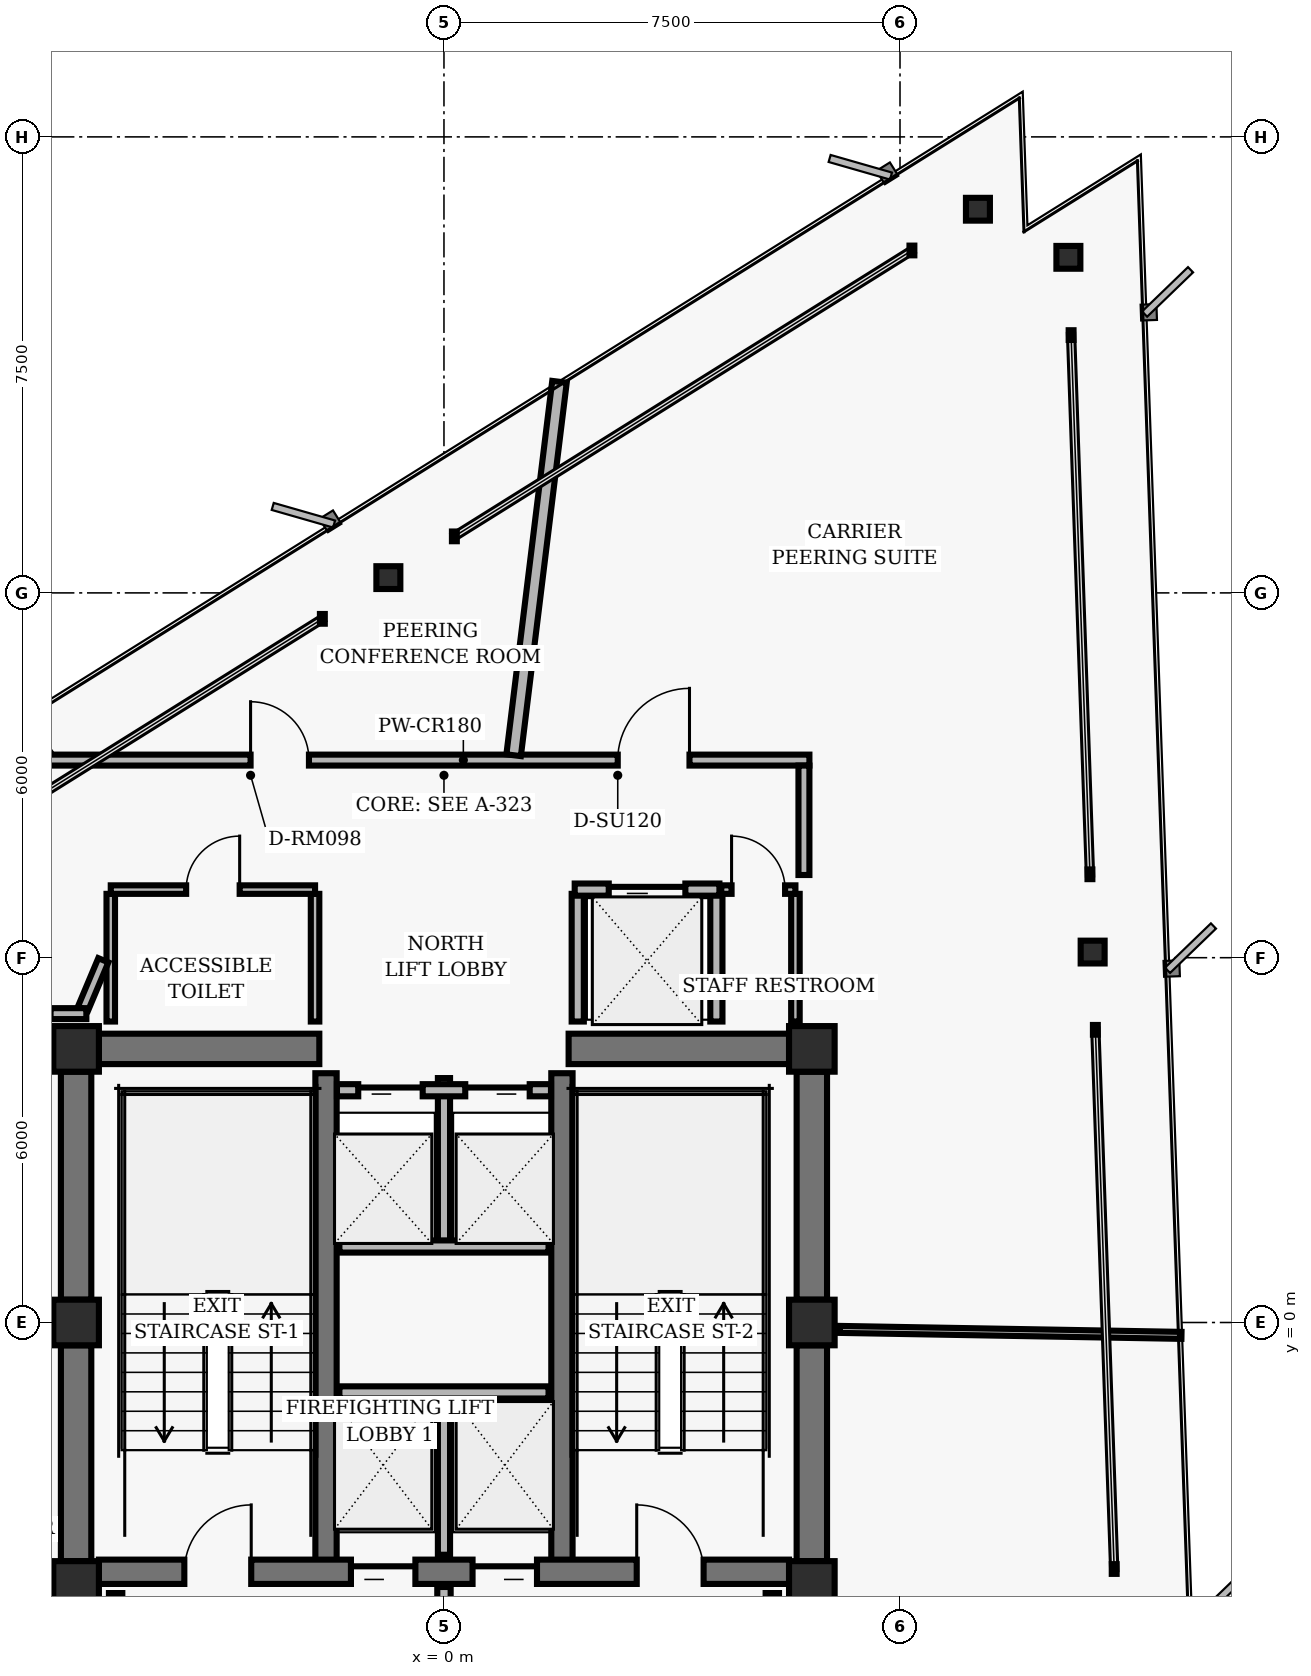
"""IFC4 building model, lengths in metres.
Left out: names, types, materials, properties, quantities, classifications, styles, units other than length and angle.
Written with IfcOpenShell. Run it as: python <this file> out.ifc"""

import sys

from ifc_helpers import new_model, si_unit, direction, frame, frame_2d, origin, origin_2d, place, context, subcontext, project, spatial, rectangle, hollow_rectangle, i_section, extrude, element, fill, save


model = new_model("IFC4")
c1 = context("Model", 3, precision=1e-05, world=origin(), true_north=direction((0.0, 1.0)))
c2 = subcontext(c1, "Body", "Model", "MODEL_VIEW")
j1 = project(units=[si_unit("LENGTHUNIT", "METRE"), si_unit("PLANEANGLEUNIT", "RADIAN")], contexts=[c1])
p1 = place(None, origin())
s1 = spatial("IfcSite", under=j1, at=p1, CompositionType="ELEMENT")
p2 = place(p1, origin())
s2 = spatial("IfcBuilding", under=s1, at=p2, CompositionType="ELEMENT")
p3 = place(p2, frame((0.0, 0.0, 211.84)))
s3 = spatial("IfcBuildingStorey", under=s2, at=p3, CompositionType="ELEMENT", Elevation=211.84)
for number, where, z_axis, x_axis in (
    (1, (-6.05, 4.5, 0.0), (0.0, 0.0, 1.0), (1.0, 0.0, 0.0)),
    (2, (6.05, 4.5, 0.0), (0.0, 0.0, 1.0), (1.0, 0.0, 0.0)),
    (3, (-6.05, 0.0, 0.0), (0.0, 0.0, 1.0), (1.0, 0.0, 0.0)),
    (4, (6.05, 0.0, 0.0), (0.0, 0.0, 1.0), (1.0, 0.0, 0.0)),
    (5, (-6.05, -4.3, 0.0), (0.0, 0.0, 1.0), (1.0, 0.0, 0.0)),
    (6, (6.05, -4.3, 0.0), (0.0, 0.0, 1.0), (1.0, 0.0, 0.0)),
):
    element("IfcColumn", number, at=place(p3, frame(where, z_axis=z_axis, x_axis=x_axis)), inside=s3, PredefinedType="COLUMN", context=c2, shape_type="SweptSolid", body=[
        extrude(hollow_rectangle(XDim=0.75, YDim=0.75, WallThickness=0.05, InnerFilletRadius=0.02, OuterFilletRadius=0.04, at=origin_2d()), origin(), (0.0, 0.0, 1.0), 3.04),
    ])
p4 = place(p3, frame((-6.05, 0.375, 0.0), z_axis=(0.0, 0.0, 1.0), x_axis=(0.0, 1.0, 0.0)))
e7 = element("IfcWall", 7, at=p4, inside=s3, PredefinedType="SHEAR", context=c2, shape_type="SweptSolid", body=[
    extrude(rectangle(XDim=3.75, YDim=0.5, at=frame_2d((1.875, 0.0))), origin(), (0.0, 0.0, 1.0), 2.618),
])
p5 = place(p3, frame((-6.05, -3.925, 0.0), z_axis=(0.0, 0.0, 1.0), x_axis=(0.0, 1.0, 0.0)))
e8 = element("IfcWall", 8, at=p5, inside=s3, PredefinedType="SHEAR", context=c2, shape_type="SweptSolid", body=[
    extrude(rectangle(XDim=3.55, YDim=0.5, at=frame_2d((1.775, 0.0))), origin(), (0.0, 0.0, 1.0), 2.618),
])
p6 = place(p3, frame((6.05, 0.375, 0.0), z_axis=(0.0, 0.0, 1.0), x_axis=(0.0, 1.0, 0.0)))
e9 = element("IfcWall", 9, at=p6, inside=s3, PredefinedType="SHEAR", context=c2, shape_type="SweptSolid", body=[
    extrude(rectangle(XDim=3.75, YDim=0.5, at=frame_2d((1.875, 0.0))), origin(), (0.0, 0.0, 1.0), 2.618),
])
p7 = place(p3, frame((6.05, -3.925, 0.0), z_axis=(0.0, 0.0, 1.0), x_axis=(0.0, 1.0, 0.0)))
e10 = element("IfcWall", 10, at=p7, inside=s3, PredefinedType="SHEAR", context=c2, shape_type="SweptSolid", body=[
    extrude(rectangle(XDim=3.55, YDim=0.5, at=frame_2d((1.775, 0.0))), origin(), (0.0, 0.0, 1.0), 2.618),
])
for number, where, z_axis, x_axis in (
    (11, (-1.94, -4.1, 0.0), (0.0, 0.0, 1.0), (0.0, 1.0, 0.0)),
    (12, (1.94, -4.1, 0.0), (0.0, 0.0, 1.0), (0.0, 1.0, 0.0)),
):
    element("IfcWall", number, at=place(p3, frame(where, z_axis=z_axis, x_axis=x_axis)), inside=s3, PredefinedType="SHEAR", context=c2, shape_type="SweptSolid", body=[
        extrude(rectangle(XDim=8.2, YDim=0.35, at=frame_2d((4.1, 0.0))), origin(), (0.0, 0.0, 1.0), 2.618),
    ])
p8 = place(p3, frame((-5.675, -4.1, 0.0), z_axis=(0.0, 0.0, 1.0), x_axis=(1.0, 0.0, 0.0)))
e13 = element("IfcWall", 13, at=p8, inside=s3, PredefinedType="SHEAR", context=c2, shape_type="SweptSolid", body=[
    extrude(rectangle(XDim=11.35, YDim=0.4, at=frame_2d((5.675, 0.0))), origin(), (0.0, 0.0, 1.0), 2.618),
])
p9 = place(p8, frame((1.405, 0.0, 0.0)))
e14 = element("IfcOpeningElement", 14, at=p9, cuts=e13, PredefinedType="OPENING", context=c2, shape_type="SweptSolid", body=[
    extrude(rectangle(XDim=1.1, YDim=2.04, at=frame_2d((0.55, 1.02))), frame((0.0, 0.21, 0.0), z_axis=(0.0, -1.0, 0.0), x_axis=(1.0, 0.0, 0.0)), (0.0, 0.0, 1.0), 0.42),
])
p10 = place(p8, frame((8.845, 0.0, 0.0)))
e15 = element("IfcOpeningElement", 15, at=p10, cuts=e13, PredefinedType="OPENING", context=c2, shape_type="SweptSolid", body=[
    extrude(rectangle(XDim=1.1, YDim=2.04, at=frame_2d((0.55, 1.02))), frame((0.0, 0.21, 0.0), z_axis=(0.0, -1.0, 0.0), x_axis=(1.0, 0.0, 0.0)), (0.0, 0.0, 1.0), 0.42),
])
p11 = place(p8, frame((4.145, 0.0, 0.0)))
e16 = element("IfcOpeningElement", 16, at=p11, cuts=e13, PredefinedType="OPENING", context=c2, shape_type="SweptSolid", body=[
    extrude(rectangle(XDim=1.06, YDim=2.04, at=frame_2d((0.53, 1.02))), frame((0.0, 0.21, 0.0), z_axis=(0.0, -1.0, 0.0), x_axis=(1.0, 0.0, 0.0)), (0.0, 0.0, 1.0), 0.42),
])
p12 = place(p8, frame((6.145, 0.0, 0.0)))
e17 = element("IfcOpeningElement", 17, at=p12, cuts=e13, PredefinedType="OPENING", context=c2, shape_type="SweptSolid", body=[
    extrude(rectangle(XDim=1.06, YDim=2.04, at=frame_2d((0.53, 1.02))), frame((0.0, 0.21, 0.0), z_axis=(0.0, -1.0, 0.0), x_axis=(1.0, 0.0, 0.0)), (0.0, 0.0, 1.0), 0.42),
])
for number, where, z_axis, x_axis in (
    (18, (-5.675, 4.5, 0.0), (0.0, 0.0, 1.0), (1.0, 0.0, 0.0)),
    (19, (2.05, 4.5, 0.0), (0.0, 0.0, 1.0), (1.0, 0.0, 0.0)),
):
    element("IfcWall", number, at=place(p3, frame(where, z_axis=z_axis, x_axis=x_axis)), inside=s3, PredefinedType="SHEAR", context=c2, shape_type="SweptSolid", body=[
        extrude(rectangle(XDim=3.625, YDim=0.5, at=frame_2d((1.812, 0.0))), origin(), (0.0, 0.0, 1.0), 2.618),
    ])
for number, where, z_axis, x_axis in (
    (20, (10.668, 6.093, 0.0), (0.0, 0.0, 1.0), (1.0, 0.0, 0.0)),
    (21, (10.269, 17.519, 0.0), (0.0, 0.0, 1.0), (1.0, 0.0, 0.0)),
    (22, (8.781, 18.31, 0.0), (0.0, 0.0, 1.0), (1.0, 0.0, 0.0)),
    (23, (-0.915, 12.251, 0.0), (0.0, 0.0, 1.0), (1.0, 0.0, 0.0)),
):
    element("IfcColumn", number, at=place(p3, frame(where, z_axis=z_axis, x_axis=x_axis)), inside=s3, PredefinedType="COLUMN", context=c2, shape_type="SweptSolid", body=[
        extrude(i_section(OverallWidth=0.394, OverallDepth=0.375, WebThickness=0.017, FlangeThickness=0.028, FilletRadius=0.016, at=origin_2d()), origin(), (0.0, 0.0, 1.0), 3.04),
    ])
p13 = place(p3, frame((0.0, -3.82, 0.0), z_axis=(0.0, 0.0, 1.0), x_axis=(0.0, 1.0, 0.0)))
e24 = element("IfcWall", 24, at=p13, inside=s3, PredefinedType="PARTITIONING", context=c2, shape_type="SweptSolid", body=[
    extrude(rectangle(XDim=2.67, YDim=0.2, at=frame_2d((1.335, 0.0))), origin(), (0.0, 0.0, 1.0), 2.593),
])
p14 = place(p3, frame((-1.72, -1.15, 0.0), z_axis=(0.0, 0.0, 1.0), x_axis=(1.0, 0.0, 0.0)))
e25 = element("IfcWall", 25, at=p14, inside=s3, PredefinedType="PARTITIONING", context=c2, shape_type="SweptSolid", body=[
    extrude(rectangle(XDim=3.44, YDim=0.2, at=frame_2d((1.72, 0.0))), origin(), (0.0, 0.0, 1.0), 2.593),
])
for number, where, z_axis, x_axis in (
    (26, (-5.4, -7.16, 0.0), (0.0, 0.0, 1.0), (0.0, 1.0, 0.0)),
    (27, (5.4, -7.16, 0.0), (0.0, 0.0, 1.0), (0.0, 1.0, 0.0)),
):
    element("IfcWall", number, at=place(p3, frame(where, z_axis=z_axis, x_axis=x_axis)), inside=s3, PredefinedType="PARTITIONING", context=c2, shape_type="SweptSolid", body=[
        extrude(rectangle(XDim=2.71, YDim=0.22, at=frame_2d((1.355, 0.0))), origin(), (0.0, 0.0, 1.0), 2.593),
    ])
p15 = place(p3, frame((0.0, -7.16, 0.0), z_axis=(0.0, 0.0, 1.0), x_axis=(0.0, 1.0, 0.0)))
e28 = element("IfcWall", 28, at=p15, inside=s3, PredefinedType="PARTITIONING", context=c2, shape_type="SweptSolid", body=[
    extrude(rectangle(XDim=2.81, YDim=0.22, at=frame_2d((1.405, 0.0))), origin(), (0.0, 0.0, 1.0), 2.593),
])
p16 = place(p3, frame((0.0, 1.25, 0.0), z_axis=(0.0, 0.0, 1.0), x_axis=(0.0, 1.0, 0.0)))
e29 = element("IfcWall", 29, at=p16, inside=s3, PredefinedType="PARTITIONING", context=c2, shape_type="SweptSolid", body=[
    extrude(rectangle(XDim=2.77, YDim=0.2, at=frame_2d((1.385, 0.0))), origin(), (0.0, 0.0, 1.0), 2.593),
])
p17 = place(p3, frame((-1.72, 1.25, 0.0), z_axis=(0.0, 0.0, 1.0), x_axis=(1.0, 0.0, 0.0)))
e30 = element("IfcWall", 30, at=p17, inside=s3, PredefinedType="PARTITIONING", context=c2, shape_type="SweptSolid", body=[
    extrude(rectangle(XDim=3.44, YDim=0.2, at=frame_2d((1.72, 0.0))), origin(), (0.0, 0.0, 1.0), 2.593),
])
p18 = place(p3, frame((-1.76, 3.82, 0.0), z_axis=(0.0, 0.0, 1.0), x_axis=(1.0, 0.0, 0.0)))
e31 = element("IfcWall", 31, at=p18, inside=s3, PredefinedType="PARTITIONING", context=c2, shape_type="SweptSolid", body=[
    extrude(rectangle(XDim=3.52, YDim=0.2, at=frame_2d((1.76, 0.0))), origin(), (0.0, 0.0, 1.0), 2.593),
])
p19 = place(p18, frame((0.35, 0.0, 0.0)))
e32 = element("IfcOpeningElement", 32, at=p19, cuts=e31, PredefinedType="OPENING", context=c2, shape_type="SweptSolid", body=[
    extrude(rectangle(XDim=1.06, YDim=2.04, at=frame_2d((0.53, 1.02))), frame((0.0, 0.11, 0.0), z_axis=(0.0, -1.0, 0.0), x_axis=(1.0, 0.0, 0.0)), (0.0, 0.0, 1.0), 0.22),
])
p20 = place(p18, frame((2.11, 0.0, 0.0)))
e33 = element("IfcOpeningElement", 33, at=p20, cuts=e31, PredefinedType="OPENING", context=c2, shape_type="SweptSolid", body=[
    extrude(rectangle(XDim=1.06, YDim=2.04, at=frame_2d((0.53, 1.02))), frame((0.0, 0.11, 0.0), z_axis=(0.0, -1.0, 0.0), x_axis=(1.0, 0.0, 0.0)), (0.0, 0.0, 1.0), 0.22),
])
for number, where, z_axis, x_axis in (
    (34, (2.2, 4.95, 0.0), (0.0, 0.0, 1.0), (0.0, 1.0, 0.0)),
    (35, (4.48, 4.95, 0.0), (0.0, 0.0, 1.0), (0.0, 1.0, 0.0)),
):
    element("IfcWall", number, at=place(p3, frame(where, z_axis=z_axis, x_axis=x_axis)), inside=s3, PredefinedType="PARTITIONING", context=c2, shape_type="SweptSolid", body=[
        extrude(rectangle(XDim=2.1, YDim=0.2, at=frame_2d((1.05, 0.0))), origin(), (0.0, 0.0, 1.0), 2.593),
    ])
p21 = place(p3, frame((2.15, 7.12, 0.0), z_axis=(0.0, 0.0, 1.0), x_axis=(1.0, 0.0, 0.0)))
e36 = element("IfcWall", 36, at=p21, inside=s3, PredefinedType="PARTITIONING", context=c2, shape_type="SweptSolid", body=[
    extrude(rectangle(XDim=2.38, YDim=0.2, at=frame_2d((1.19, 0.0))), origin(), (0.0, 0.0, 1.0), 2.593),
])
p22 = place(p21, frame((0.56, 0.0, 0.0)))
e37 = element("IfcOpeningElement", 37, at=p22, cuts=e36, PredefinedType="OPENING", context=c2, shape_type="SweptSolid", body=[
    extrude(rectangle(XDim=1.26, YDim=2.06, at=frame_2d((0.63, 1.03))), frame((0.0, 0.11, 0.0), z_axis=(0.0, -1.0, 0.0), x_axis=(1.0, 0.0, 0.0)), (0.0, 0.0, 1.0), 0.22),
])
for number, where, z_axis, x_axis in (
    (38, (-5.48, 4.95, 0.0), (0.0, 0.0, 1.0), (0.0, 1.0, 0.0)),
    (39, (-2.12, 4.95, 0.0), (0.0, 0.0, 1.0), (0.0, 1.0, 0.0)),
):
    element("IfcWall", number, at=place(p3, frame(where, z_axis=z_axis, x_axis=x_axis)), inside=s3, PredefinedType="PARTITIONING", context=c2, shape_type="SweptSolid", body=[
        extrude(rectangle(XDim=2.1, YDim=0.14, at=frame_2d((1.05, 0.0))), origin(), (0.0, 0.0, 1.0), 2.593),
    ])
p23 = place(p3, frame((-5.48, 7.12, 0.0), z_axis=(0.0, 0.0, 1.0), x_axis=(1.0, 0.0, 0.0)))
e40 = element("IfcWall", 40, at=p23, inside=s3, PredefinedType="PARTITIONING", context=c2, shape_type="SweptSolid", body=[
    extrude(rectangle(XDim=3.36, YDim=0.14, at=frame_2d((1.68, 0.0))), origin(), (0.0, 0.0, 1.0), 2.593),
])
p24 = place(p23, frame((1.24, 0.0, 0.0)))
e41 = element("IfcOpeningElement", 41, at=p24, cuts=e40, PredefinedType="OPENING", context=c2, shape_type="SweptSolid", body=[
    extrude(rectangle(XDim=0.88, YDim=2.02, at=frame_2d((0.44, 1.01))), frame((0.0, 0.08, 0.0), z_axis=(0.0, -1.0, 0.0), x_axis=(1.0, 0.0, 0.0)), (0.0, 0.0, 1.0), 0.16),
])
p25 = place(p3, frame((5.78, 4.95, 0.0), z_axis=(0.0, 0.0, 1.0), x_axis=(0.0, 1.0, 0.0)))
e42 = element("IfcWall", 42, at=p25, inside=s3, PredefinedType="PARTITIONING", context=c2, shape_type="SweptSolid", body=[
    extrude(rectangle(XDim=2.1, YDim=0.14, at=frame_2d((1.05, 0.0))), origin(), (0.0, 0.0, 1.0), 2.073),
])
p26 = place(p3, frame((4.56, 7.12, 0.0), z_axis=(0.0, 0.0, 1.0), x_axis=(1.0, 0.0, 0.0)))
e43 = element("IfcWall", 43, at=p26, inside=s3, PredefinedType="PARTITIONING", context=c2, shape_type="SweptSolid", body=[
    extrude(rectangle(XDim=1.22, YDim=0.14, at=frame_2d((0.61, 0.0))), origin(), (0.0, 0.0, 1.0), 2.593),
])
p27 = place(p26, frame((0.17, 0.0, 0.0)))
e44 = element("IfcOpeningElement", 44, at=p27, cuts=e43, PredefinedType="OPENING", context=c2, shape_type="SweptSolid", body=[
    extrude(rectangle(XDim=0.88, YDim=2.02, at=frame_2d((0.44, 1.01))), frame((0.0, 0.08, 0.0), z_axis=(0.0, -1.0, 0.0), x_axis=(1.0, 0.0, 0.0)), (0.0, 0.0, 1.0), 0.16),
])
p28 = place(p3, frame((-7.29, 9.25, 0.0), z_axis=(0.0, 0.0, 1.0), x_axis=(1.0, 0.0, 0.0)))
e45 = element("IfcWall", 45, at=p28, inside=s3, PredefinedType="PARTITIONING", context=c2, shape_type="SweptSolid", body=[
    extrude(rectangle(XDim=13.3, YDim=0.18, at=frame_2d((6.65, 0.0))), origin(), (0.0, 0.0, 1.0), 2.593),
])
p29 = place(p28, frame((10.148, 0.0, 0.0)))
e46 = element("IfcOpeningElement", 46, at=p29, cuts=e45, PredefinedType="OPENING", context=c2, shape_type="SweptSolid", body=[
    extrude(rectangle(XDim=1.18, YDim=2.02, at=frame_2d((0.59, 1.01))), frame((0.0, 0.1, 0.0), z_axis=(0.0, -1.0, 0.0), x_axis=(1.0, 0.0, 0.0)), (0.0, 0.0, 1.0), 0.2),
])
p30 = place(p28, frame((4.11, 0.0, 0.0)))
e47 = element("IfcOpeningElement", 47, at=p30, cuts=e45, PredefinedType="OPENING", context=c2, shape_type="SweptSolid", body=[
    extrude(rectangle(XDim=0.96, YDim=2.02, at=frame_2d((0.48, 1.01))), frame((0.0, 0.1, 0.0), z_axis=(0.0, -1.0, 0.0), x_axis=(1.0, 0.0, 0.0)), (0.0, 0.0, 1.0), 0.2),
])
p31 = place(p3, frame((5.92, 9.16, 0.0), z_axis=(0.0, 0.0, 1.0), x_axis=(0.0, -1.0, 0.0)))
e48 = element("IfcWall", 48, at=p31, inside=s3, PredefinedType="PARTITIONING", context=c2, shape_type="SweptSolid", body=[
    extrude(rectangle(XDim=1.8, YDim=0.18, at=frame_2d((0.9, 0.0))), origin(), (0.0, 0.0, 1.0), 2.593),
])
p32 = place(p3, frame((-5.602, 5.958, 0.0), z_axis=(0.0, 0.0, 1.0), x_axis=(-0.387588639363, -0.921832439566, 0.0)))
e49 = element("IfcWall", 49, at=p32, inside=s3, PredefinedType="PARTITIONING", context=c2, shape_type="SweptSolid", body=[
    extrude(rectangle(XDim=0.862, YDim=0.18, at=frame_2d((0.431, 0.0))), origin(), (0.0, 0.0, 1.0), 2.593),
])
p33 = place(p3, frame((-5.881, 5.08, 0.0), z_axis=(0.0, 0.0, 1.0), x_axis=(-1.0, 0.0, 0.0)))
e50 = element("IfcWall", 50, at=p33, inside=s3, PredefinedType="PARTITIONING", context=c2, shape_type="SweptSolid", body=[
    extrude(rectangle(XDim=0.589, YDim=0.18, at=frame_2d((0.294, 0.0))), origin(), (0.0, 0.0, 1.0), 2.593),
])
p34 = place(p3, frame((6.51, -0.114, 0.0), z_axis=(0.0, 0.0, 1.0), x_axis=(0.999847502382, -0.017463446992, 0.0)))
e51 = element("IfcWall", 51, at=p34, inside=s3, PredefinedType="MOVABLE", context=c2, shape_type="SweptSolid", body=[
    extrude(rectangle(XDim=5.62, YDim=0.115, at=frame_2d((2.81, 0.0))), origin(), (0.0, 0.0, 1.0), 2.593),
])
p35 = place(p3, frame((1.146, 9.33, 0.0), z_axis=(0.0, 0.0, 1.0), x_axis=(0.121873572304, 0.992545632389, 0.0)))
e52 = element("IfcWall", 52, at=p35, inside=s3, PredefinedType="PARTITIONING", context=c2, shape_type="SweptSolid", body=[
    extrude(rectangle(XDim=6.188, YDim=0.24, at=frame_2d((3.094, 0.0))), origin(), (0.0, 0.0, 1.0), 2.593),
])
p36 = place(p9, origin())
e53 = element("IfcDoor", 53, at=p36, inside=s3, OperationType="SINGLE_SWING_RIGHT", PredefinedType="DOOR", context=c2, shape_type="SweptSolid", body=[
    extrude(rectangle(XDim=1.1, YDim=2.04, at=frame_2d((0.55, 1.02))), frame((0.0, 0.025, 0.0), z_axis=(0.0, -1.0, 0.0), x_axis=(1.0, 0.0, 0.0)), (0.0, 0.0, 1.0), 0.05),
])
fill(e14, e53)
p37 = place(p10, origin())
e54 = element("IfcDoor", 54, at=p37, inside=s3, OperationType="SINGLE_SWING_LEFT", PredefinedType="DOOR", context=c2, shape_type="SweptSolid", body=[
    extrude(rectangle(XDim=1.1, YDim=2.04, at=frame_2d((0.55, 1.02))), frame((0.0, 0.025, 0.0), z_axis=(0.0, -1.0, 0.0), x_axis=(1.0, 0.0, 0.0)), (0.0, 0.0, 1.0), 0.05),
])
fill(e15, e54)
p38 = place(p11, origin())
e55 = element("IfcDoor", 55, at=p38, inside=s3, OperationType="SLIDING_TO_LEFT", PredefinedType="DOOR", context=c2, shape_type="SweptSolid", body=[
    extrude(rectangle(XDim=1.06, YDim=2.04, at=frame_2d((0.53, 1.02))), frame((0.0, 0.025, 0.0), z_axis=(0.0, -1.0, 0.0), x_axis=(1.0, 0.0, 0.0)), (0.0, 0.0, 1.0), 0.05),
])
fill(e16, e55)
p39 = place(p12, origin())
e56 = element("IfcDoor", 56, at=p39, inside=s3, OperationType="SLIDING_TO_RIGHT", PredefinedType="DOOR", context=c2, shape_type="SweptSolid", body=[
    extrude(rectangle(XDim=1.06, YDim=2.04, at=frame_2d((0.53, 1.02))), frame((0.0, 0.025, 0.0), z_axis=(0.0, -1.0, 0.0), x_axis=(1.0, 0.0, 0.0)), (0.0, 0.0, 1.0), 0.05),
])
fill(e17, e56)
p40 = place(p19, origin())
e57 = element("IfcDoor", 57, at=p40, inside=s3, OperationType="SLIDING_TO_LEFT", PredefinedType="DOOR", context=c2, shape_type="SweptSolid", body=[
    extrude(rectangle(XDim=1.06, YDim=2.04, at=frame_2d((0.53, 1.02))), frame((0.0, 0.025, 0.0), z_axis=(0.0, -1.0, 0.0), x_axis=(1.0, 0.0, 0.0)), (0.0, 0.0, 1.0), 0.05),
])
fill(e32, e57)
p41 = place(p20, origin())
e58 = element("IfcDoor", 58, at=p41, inside=s3, OperationType="SLIDING_TO_RIGHT", PredefinedType="DOOR", context=c2, shape_type="SweptSolid", body=[
    extrude(rectangle(XDim=1.06, YDim=2.04, at=frame_2d((0.53, 1.02))), frame((0.0, 0.025, 0.0), z_axis=(0.0, -1.0, 0.0), x_axis=(1.0, 0.0, 0.0)), (0.0, 0.0, 1.0), 0.05),
])
fill(e33, e58)
p42 = place(p22, origin())
e59 = element("IfcDoor", 59, at=p42, inside=s3, OperationType="SLIDING_TO_LEFT", PredefinedType="DOOR", context=c2, shape_type="SweptSolid", body=[
    extrude(rectangle(XDim=1.26, YDim=2.06, at=frame_2d((0.63, 1.03))), frame((0.0, 0.025, 0.0), z_axis=(0.0, -1.0, 0.0), x_axis=(1.0, 0.0, 0.0)), (0.0, 0.0, 1.0), 0.05),
])
fill(e37, e59)
p43 = place(p24, origin())
e60 = element("IfcDoor", 60, at=p43, inside=s3, OperationType="SINGLE_SWING_RIGHT", PredefinedType="DOOR", context=c2, shape_type="SweptSolid", body=[
    extrude(rectangle(XDim=0.88, YDim=2.02, at=frame_2d((0.44, 1.01))), frame((0.0, 0.025, 0.0), z_axis=(0.0, -1.0, 0.0), x_axis=(1.0, 0.0, 0.0)), (0.0, 0.0, 1.0), 0.05),
])
fill(e41, e60)
p44 = place(p27, origin())
e61 = element("IfcDoor", 61, at=p44, inside=s3, OperationType="SINGLE_SWING_LEFT", PredefinedType="DOOR", context=c2, shape_type="SweptSolid", body=[
    extrude(rectangle(XDim=0.88, YDim=2.02, at=frame_2d((0.44, 1.01))), frame((0.0, 0.025, 0.0), z_axis=(0.0, -1.0, 0.0), x_axis=(1.0, 0.0, 0.0)), (0.0, 0.0, 1.0), 0.05),
])
fill(e44, e61)
p45 = place(p29, origin())
e62 = element("IfcDoor", 62, at=p45, inside=s3, OperationType="SINGLE_SWING_RIGHT", PredefinedType="DOOR", context=c2, shape_type="SweptSolid", body=[
    extrude(rectangle(XDim=1.18, YDim=2.02, at=frame_2d((0.59, 1.01))), frame((0.0, 0.025, 0.0), z_axis=(0.0, -1.0, 0.0), x_axis=(1.0, 0.0, 0.0)), (0.0, 0.0, 1.0), 0.05),
])
fill(e46, e62)
p46 = place(p30, origin())
e63 = element("IfcDoor", 63, at=p46, inside=s3, OperationType="SINGLE_SWING_LEFT", PredefinedType="DOOR", context=c2, shape_type="SweptSolid", body=[
    extrude(rectangle(XDim=0.96, YDim=2.02, at=frame_2d((0.48, 1.01))), frame((0.0, 0.025, 0.0), z_axis=(0.0, -1.0, 0.0), x_axis=(1.0, 0.0, 0.0)), (0.0, 0.0, 1.0), 0.05),
])
fill(e47, e63)
save(model, sys.argv[1])
